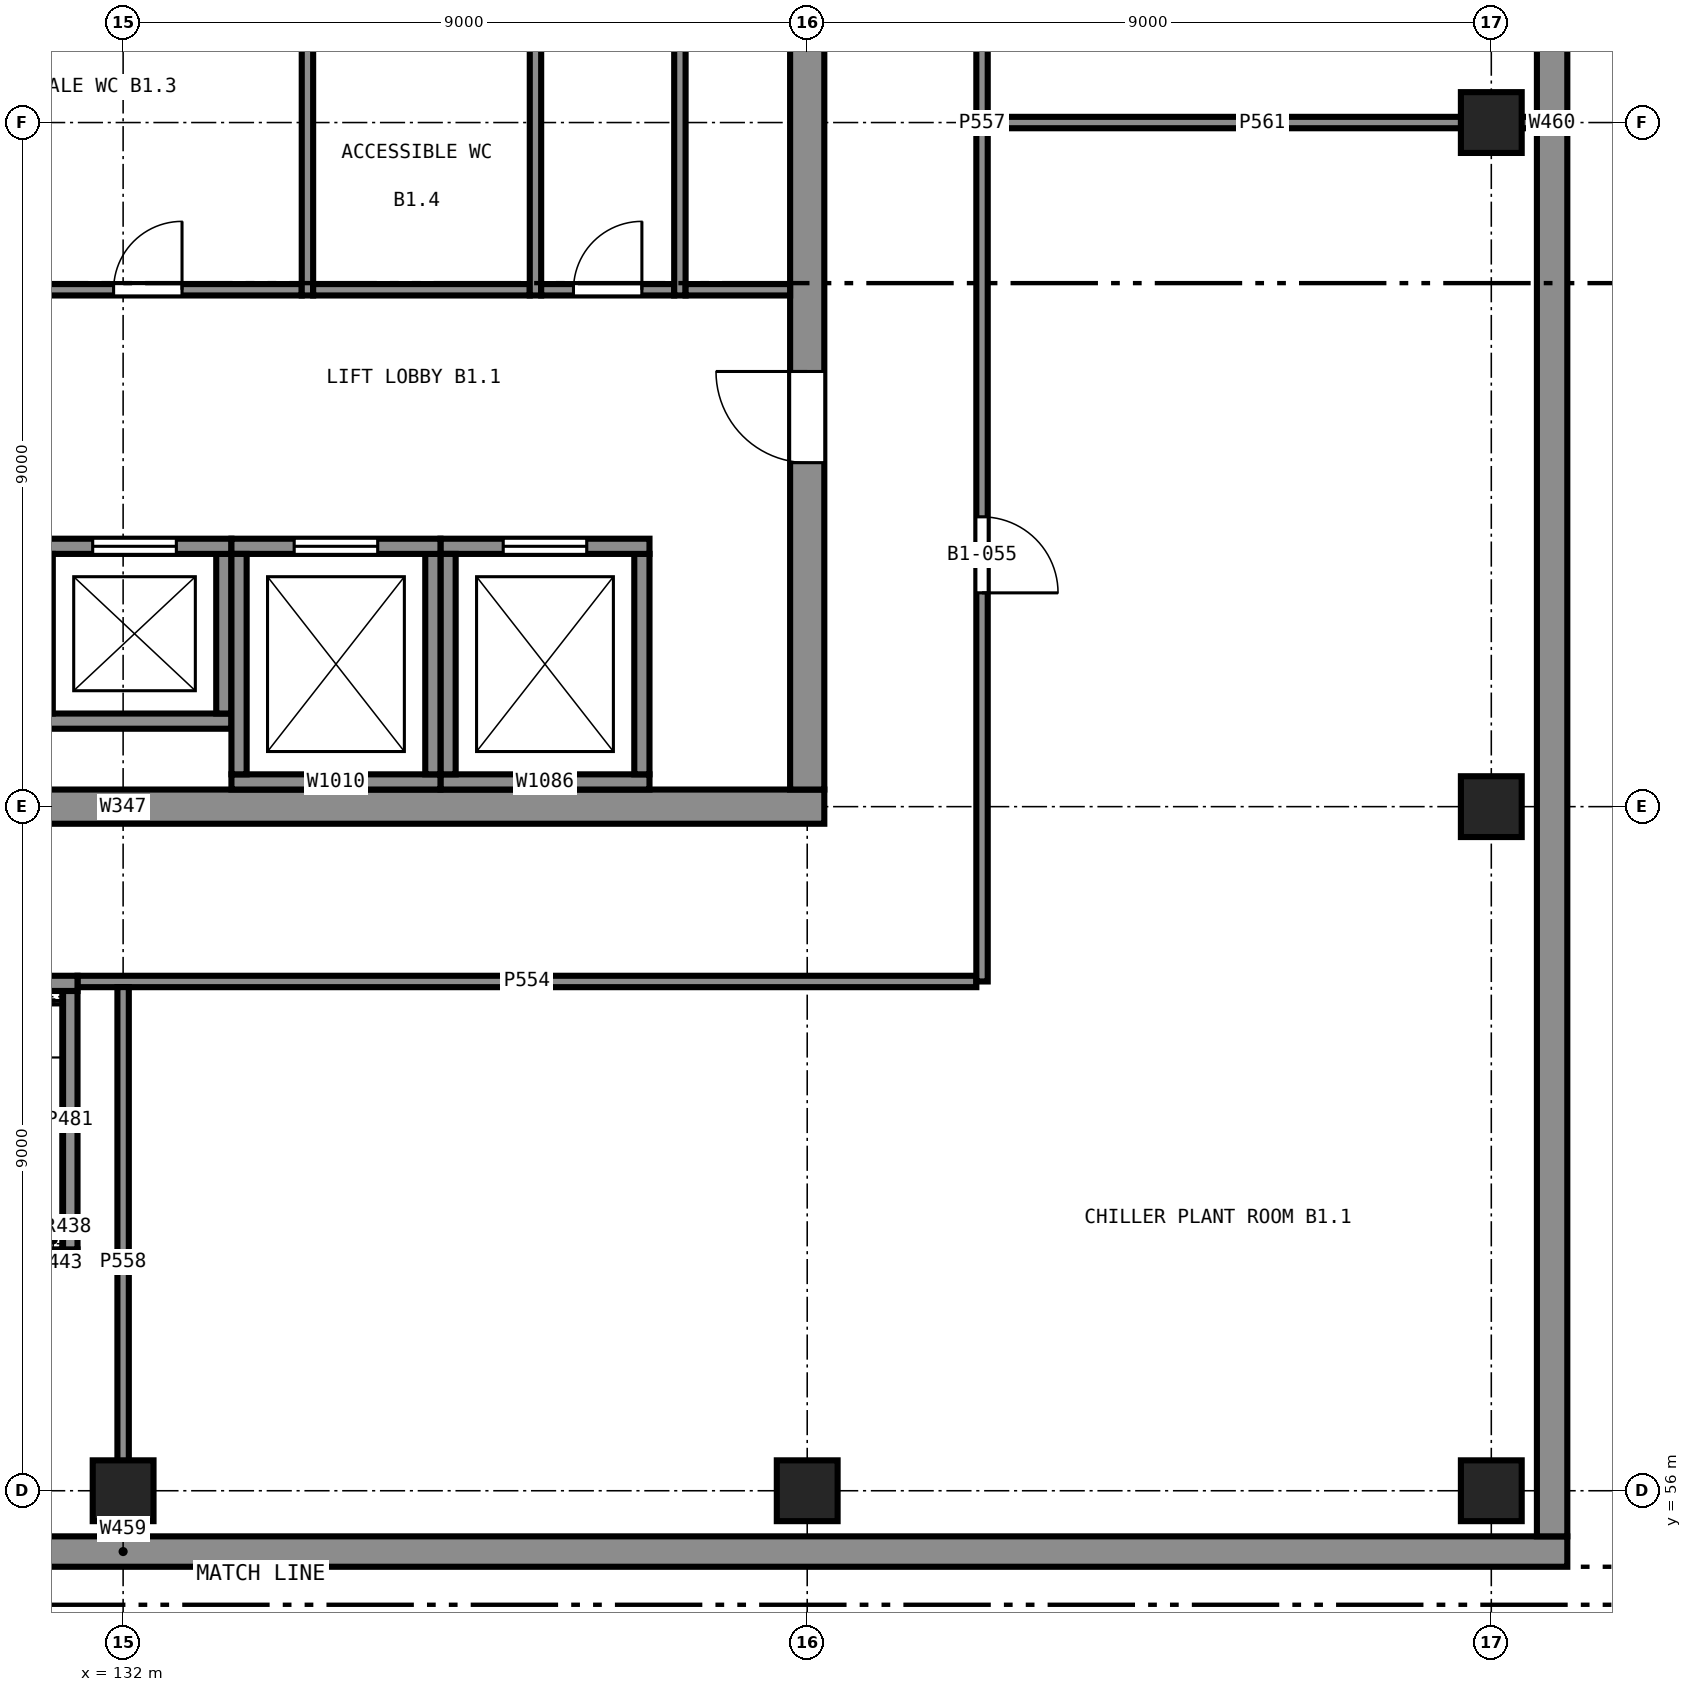
"""IFC4 building model, lengths in metres.
Left out: names, types, materials, properties, quantities, classifications, styles, units other than length and angle.
Written with IfcOpenShell. Run it as: python <this file> out.ifc"""

import sys

from ifc_helpers import new_model, si_unit, direction, frame, frame_2d, origin, origin_2d, place, context, subcontext, project, spatial, rectangle, extrude, element, fill, save


model = new_model("IFC4")
c1 = context("Model", 3, precision=1e-05, world=origin(), true_north=direction((0.0, 1.0)))
c2 = subcontext(c1, "Body", "Model", "MODEL_VIEW")
j1 = project(units=[si_unit("LENGTHUNIT", "METRE"), si_unit("PLANEANGLEUNIT", "RADIAN")], contexts=[c1])
p1 = place(None, origin())
s1 = spatial("IfcSite", under=j1, at=p1, CompositionType="ELEMENT")
p2 = place(p1, origin())
s2 = spatial("IfcBuilding", under=s1, at=p2, CompositionType="ELEMENT")
p3 = place(p2, frame((0.0, 0.0, -5.0)))
s3 = spatial("IfcBuildingStorey", under=s2, at=p3, CompositionType="ELEMENT", Elevation=-5.0)
for number, where, z_axis, x_axis in (
    (1, (132.0, 56.0, 0.0), (0.0, 0.0, 1.0), (1.0, 0.0, 0.0)),
    (2, (141.0, 56.0, 0.0), (0.0, 0.0, 1.0), (1.0, 0.0, 0.0)),
    (3, (150.0, 56.0, 0.0), (0.0, 0.0, 1.0), (1.0, 0.0, 0.0)),
    (4, (150.0, 65.0, 0.0), (0.0, 0.0, 1.0), (1.0, 0.0, 0.0)),
    (5, (150.0, 74.0, 0.0), (0.0, 0.0, 1.0), (1.0, 0.0, 0.0)),
):
    element("IfcColumn", number, at=place(p3, frame(where, z_axis=z_axis, x_axis=x_axis)), inside=s3, PredefinedType="COLUMN", context=c2, shape_type="SweptSolid", body=[
        extrude(rectangle(XDim=0.8, YDim=0.8, at=origin_2d()), origin(), (0.0, 0.0, 1.0), 5.0),
    ])
p4 = place(p3, frame((122.775, 65.0, 0.0), z_axis=(0.0, 0.0, 1.0), x_axis=(1.0, 0.0, 0.0)))
e6 = element("IfcWall", 6, at=p4, inside=s3, PredefinedType="SHEAR", context=c2, shape_type="SweptSolid", body=[
    extrude(rectangle(XDim=18.45, YDim=0.45, at=frame_2d((9.225, 0.0))), origin(), (0.0, 0.0, 1.0), 5.0),
])
p5 = place(p3, frame((141.0, 65.225, 0.0), z_axis=(0.0, 0.0, 1.0), x_axis=(0.0, 1.0, 0.0)))
e7 = element("IfcWall", 7, at=p5, inside=s3, PredefinedType="SHEAR", context=c2, shape_type="SweptSolid", body=[
    extrude(rectangle(XDim=17.55, YDim=0.45, at=frame_2d((8.775, 0.0))), origin(), (0.0, 0.0, 1.0), 5.0),
])
p6 = place(p5, frame((4.3, 0.0, 0.0)))
e8 = element("IfcOpeningElement", 8, at=p6, cuts=e7, PredefinedType="OPENING", context=c2, shape_type="SweptSolid", body=[
    extrude(rectangle(XDim=1.2, YDim=2.1, at=frame_2d((0.6, 1.05))), frame((0.0, 0.235, 0.0), z_axis=(0.0, -1.0, 0.0), x_axis=(1.0, 0.0, 0.0)), (0.0, 0.0, 1.0), 0.47),
])
p7 = place(p5, frame((12.05, 0.0, 0.0)))
e9 = element("IfcOpeningElement", 9, at=p7, cuts=e7, PredefinedType="OPENING", context=c2, shape_type="SweptSolid", body=[
    extrude(rectangle(XDim=1.2, YDim=2.1, at=frame_2d((0.6, 1.05))), frame((0.0, 0.235, 0.0), z_axis=(0.0, -1.0, 0.0), x_axis=(1.0, 0.0, 0.0)), (0.0, 0.0, 1.0), 0.47),
])
p8 = place(p3, frame((113.0, 55.2, 0.0), z_axis=(0.0, 0.0, 1.0), x_axis=(1.0, 0.0, 0.0)))
e10 = element("IfcWall", 10, at=p8, inside=s3, PredefinedType="SOLIDWALL", context=c2, shape_type="SweptSolid", body=[
    extrude(rectangle(XDim=38.0, YDim=0.4, at=frame_2d((19.0, 0.0))), origin(), (0.0, 0.0, 1.0), 4.58),
])
p9 = place(p3, frame((150.8, 55.4, 0.0), z_axis=(0.0, 0.0, 1.0), x_axis=(0.0, 1.0, 0.0)))
e11 = element("IfcWall", 11, at=p9, inside=s3, PredefinedType="SOLIDWALL", context=c2, shape_type="SweptSolid", body=[
    extrude(rectangle(XDim=37.2, YDim=0.4, at=frame_2d((18.6, 0.0))), origin(), (0.0, 0.0, 1.0), 4.58),
])
p10 = place(p3, frame((130.875, 66.125, 0.0), z_axis=(0.0, 0.0, 1.0), x_axis=(1.0, 0.0, 0.0)))
e12 = element("IfcWall", 12, at=p10, inside=s3, PredefinedType="SHEAR", context=c2, shape_type="SweptSolid", body=[
    extrude(rectangle(XDim=2.55, YDim=0.2, at=frame_2d((1.275, 0.0))), origin(), (0.0, 0.0, 1.0), 5.0),
])
p11 = place(p3, frame((133.325, 66.225, 0.0), z_axis=(0.0, 0.0, 1.0), x_axis=(0.0, 1.0, 0.0)))
e13 = element("IfcWall", 13, at=p11, inside=s3, PredefinedType="SHEAR", context=c2, shape_type="SweptSolid", body=[
    extrude(rectangle(XDim=2.1, YDim=0.2, at=frame_2d((1.05, 0.0))), origin(), (0.0, 0.0, 1.0), 5.0),
])
p12 = place(p3, frame((133.425, 68.425, 0.0), z_axis=(0.0, 0.0, 1.0), x_axis=(-1.0, 0.0, 0.0)))
e14 = element("IfcWall", 14, at=p12, inside=s3, PredefinedType="SHEAR", context=c2, shape_type="SweptSolid", body=[
    extrude(rectangle(XDim=2.55, YDim=0.2, at=frame_2d((1.275, 0.0))), origin(), (0.0, 0.0, 1.0), 5.0),
])
p13 = place(p12, frame((0.725, 0.0, 0.0)))
e15 = element("IfcOpeningElement", 15, at=p13, cuts=e14, PredefinedType="OPENING", context=c2, shape_type="SweptSolid", body=[
    extrude(rectangle(XDim=1.1, YDim=2.1, at=frame_2d((0.55, 1.05))), frame((0.0, 0.11, 0.0), z_axis=(0.0, -1.0, 0.0), x_axis=(1.0, 0.0, 0.0)), (0.0, 0.0, 1.0), 0.22),
])
p14 = place(p3, frame((130.975, 68.325, 0.0), z_axis=(0.0, 0.0, 1.0), x_axis=(0.0, -1.0, 0.0)))
e16 = element("IfcWall", 16, at=p14, inside=s3, PredefinedType="SHEAR", context=c2, shape_type="SweptSolid", body=[
    extrude(rectangle(XDim=2.1, YDim=0.2, at=frame_2d((1.05, 0.0))), origin(), (0.0, 0.0, 1.0), 5.0),
])
p15 = place(p3, frame((133.425, 65.325, 0.0), z_axis=(0.0, 0.0, 1.0), x_axis=(1.0, 0.0, 0.0)))
e17 = element("IfcWall", 17, at=p15, inside=s3, PredefinedType="SHEAR", context=c2, shape_type="SweptSolid", body=[
    extrude(rectangle(XDim=2.75, YDim=0.2, at=frame_2d((1.375, 0.0))), origin(), (0.0, 0.0, 1.0), 5.0),
])
p16 = place(p3, frame((136.075, 65.425, 0.0), z_axis=(0.0, 0.0, 1.0), x_axis=(0.0, 1.0, 0.0)))
e18 = element("IfcWall", 18, at=p16, inside=s3, PredefinedType="SHEAR", context=c2, shape_type="SweptSolid", body=[
    extrude(rectangle(XDim=2.9, YDim=0.2, at=frame_2d((1.45, 0.0))), origin(), (0.0, 0.0, 1.0), 5.0),
])
p17 = place(p3, frame((136.175, 68.425, 0.0), z_axis=(0.0, 0.0, 1.0), x_axis=(-1.0, 0.0, 0.0)))
e19 = element("IfcWall", 19, at=p17, inside=s3, PredefinedType="SHEAR", context=c2, shape_type="SweptSolid", body=[
    extrude(rectangle(XDim=2.75, YDim=0.2, at=frame_2d((1.375, 0.0))), origin(), (0.0, 0.0, 1.0), 5.0),
])
p18 = place(p17, frame((0.825, 0.0, 0.0)))
e20 = element("IfcOpeningElement", 20, at=p18, cuts=e19, PredefinedType="OPENING", context=c2, shape_type="SweptSolid", body=[
    extrude(rectangle(XDim=1.1, YDim=2.1, at=frame_2d((0.55, 1.05))), frame((0.0, 0.11, 0.0), z_axis=(0.0, -1.0, 0.0), x_axis=(1.0, 0.0, 0.0)), (0.0, 0.0, 1.0), 0.22),
])
p19 = place(p3, frame((133.525, 68.325, 0.0), z_axis=(0.0, 0.0, 1.0), x_axis=(0.0, -1.0, 0.0)))
e21 = element("IfcWall", 21, at=p19, inside=s3, PredefinedType="SHEAR", context=c2, shape_type="SweptSolid", body=[
    extrude(rectangle(XDim=2.9, YDim=0.2, at=frame_2d((1.45, 0.0))), origin(), (0.0, 0.0, 1.0), 5.0),
])
p20 = place(p3, frame((136.175, 65.325, 0.0), z_axis=(0.0, 0.0, 1.0), x_axis=(1.0, 0.0, 0.0)))
e22 = element("IfcWall", 22, at=p20, inside=s3, PredefinedType="SHEAR", context=c2, shape_type="SweptSolid", body=[
    extrude(rectangle(XDim=2.75, YDim=0.2, at=frame_2d((1.375, 0.0))), origin(), (0.0, 0.0, 1.0), 5.0),
])
p21 = place(p3, frame((138.825, 65.425, 0.0), z_axis=(0.0, 0.0, 1.0), x_axis=(0.0, 1.0, 0.0)))
e23 = element("IfcWall", 23, at=p21, inside=s3, PredefinedType="SHEAR", context=c2, shape_type="SweptSolid", body=[
    extrude(rectangle(XDim=2.9, YDim=0.2, at=frame_2d((1.45, 0.0))), origin(), (0.0, 0.0, 1.0), 5.0),
])
p22 = place(p3, frame((138.925, 68.425, 0.0), z_axis=(0.0, 0.0, 1.0), x_axis=(-1.0, 0.0, 0.0)))
e24 = element("IfcWall", 24, at=p22, inside=s3, PredefinedType="SHEAR", context=c2, shape_type="SweptSolid", body=[
    extrude(rectangle(XDim=2.75, YDim=0.2, at=frame_2d((1.375, 0.0))), origin(), (0.0, 0.0, 1.0), 5.0),
])
p23 = place(p22, frame((0.825, 0.0, 0.0)))
e25 = element("IfcOpeningElement", 25, at=p23, cuts=e24, PredefinedType="OPENING", context=c2, shape_type="SweptSolid", body=[
    extrude(rectangle(XDim=1.1, YDim=2.1, at=frame_2d((0.55, 1.05))), frame((0.0, 0.11, 0.0), z_axis=(0.0, -1.0, 0.0), x_axis=(1.0, 0.0, 0.0)), (0.0, 0.0, 1.0), 0.22),
])
p24 = place(p3, frame((136.275, 68.325, 0.0), z_axis=(0.0, 0.0, 1.0), x_axis=(0.0, -1.0, 0.0)))
e26 = element("IfcWall", 26, at=p24, inside=s3, PredefinedType="SHEAR", context=c2, shape_type="SweptSolid", body=[
    extrude(rectangle(XDim=2.9, YDim=0.2, at=frame_2d((1.45, 0.0))), origin(), (0.0, 0.0, 1.0), 5.0),
])
p25 = place(p3, frame((123.6, 59.075, 0.0), z_axis=(0.0, 0.0, 1.0), x_axis=(1.0, 0.0, 0.0)))
e27 = element("IfcWall", 27, at=p25, inside=s3, PredefinedType="SHEAR", context=c2, shape_type="SweptSolid", body=[
    extrude(rectangle(XDim=7.8, YDim=0.2, at=frame_2d((3.9, 0.0))), origin(), (0.0, 0.0, 1.0), 4.58),
])
p26 = place(p3, frame((131.3, 59.175, 0.0), z_axis=(0.0, 0.0, 1.0), x_axis=(0.0, 1.0, 0.0)))
e28 = element("IfcWall", 28, at=p26, inside=s3, PredefinedType="SHEAR", context=c2, shape_type="SweptSolid", body=[
    extrude(rectangle(XDim=3.4, YDim=0.2, at=frame_2d((1.7, 0.0))), origin(), (0.0, 0.0, 1.0), 4.58),
])
p27 = place(p3, frame((131.4, 62.675, 0.0), z_axis=(0.0, 0.0, 1.0), x_axis=(-1.0, 0.0, 0.0)))
e29 = element("IfcWall", 29, at=p27, inside=s3, PredefinedType="SHEAR", context=c2, shape_type="SweptSolid", body=[
    extrude(rectangle(XDim=7.8, YDim=0.2, at=frame_2d((3.9, 0.0))), origin(), (0.0, 0.0, 1.0), 4.58),
])
p28 = place(p27, frame((6.2, 0.0, 0.0)))
e30 = element("IfcOpeningElement", 30, at=p28, cuts=e29, PredefinedType="OPENING", context=c2, shape_type="SweptSolid", body=[
    extrude(rectangle(XDim=1.0, YDim=2.1, at=frame_2d((0.5, 1.05))), frame((0.0, 0.11, 0.0), z_axis=(0.0, -1.0, 0.0), x_axis=(1.0, 0.0, 0.0)), (0.0, 0.0, 1.0), 0.22),
])
p29 = place(p3, frame((134.425, 71.725, 0.0), z_axis=(0.0, 0.0, 1.0), x_axis=(0.0, 1.0, 0.0)))
e31 = element("IfcWall", 31, at=p29, inside=s3, PredefinedType="PARTITIONING", context=c2, shape_type="SweptSolid", body=[
    extrude(rectangle(XDim=4.55, YDim=0.15, at=frame_2d((2.275, 0.0))), origin(), (0.0, 0.0, 1.0), 4.58),
])
p30 = place(p3, frame((130.3, 71.8, 0.0), z_axis=(0.0, 0.0, 1.0), x_axis=(1.0, 0.0, 0.0)))
e32 = element("IfcWall", 32, at=p30, inside=s3, PredefinedType="PARTITIONING", context=c2, shape_type="SweptSolid", body=[
    extrude(rectangle(XDim=4.05, YDim=0.15, at=frame_2d((2.025, 0.0))), origin(), (0.0, 0.0, 1.0), 4.58),
])
p31 = place(p30, frame((1.575, 0.0, 0.0)))
e33 = element("IfcOpeningElement", 33, at=p31, cuts=e32, PredefinedType="OPENING", context=c2, shape_type="SweptSolid", body=[
    extrude(rectangle(XDim=0.9, YDim=2.1, at=frame_2d((0.45, 1.05))), frame((0.0, 0.085, 0.0), z_axis=(0.0, -1.0, 0.0), x_axis=(1.0, 0.0, 0.0)), (0.0, 0.0, 1.0), 0.17),
])
p32 = place(p3, frame((137.425, 71.725, 0.0), z_axis=(0.0, 0.0, 1.0), x_axis=(0.0, 1.0, 0.0)))
e34 = element("IfcWall", 34, at=p32, inside=s3, PredefinedType="PARTITIONING", context=c2, shape_type="SweptSolid", body=[
    extrude(rectangle(XDim=4.55, YDim=0.15, at=frame_2d((2.275, 0.0))), origin(), (0.0, 0.0, 1.0), 4.58),
])
p33 = place(p3, frame((134.5, 71.8, 0.0), z_axis=(0.0, 0.0, 1.0), x_axis=(1.0, 0.0, 0.0)))
e35 = element("IfcWall", 35, at=p33, inside=s3, PredefinedType="PARTITIONING", context=c2, shape_type="SweptSolid", body=[
    extrude(rectangle(XDim=2.85, YDim=0.15, at=frame_2d((1.425, 0.0))), origin(), (0.0, 0.0, 1.0), 4.58),
])
p34 = place(p3, frame((139.325, 71.725, 0.0), z_axis=(0.0, 0.0, 1.0), x_axis=(0.0, 1.0, 0.0)))
e36 = element("IfcWall", 36, at=p34, inside=s3, PredefinedType="PARTITIONING", context=c2, shape_type="SweptSolid", body=[
    extrude(rectangle(XDim=4.55, YDim=0.15, at=frame_2d((2.275, 0.0))), origin(), (0.0, 0.0, 1.0), 4.58),
])
p35 = place(p3, frame((137.5, 71.8, 0.0), z_axis=(0.0, 0.0, 1.0), x_axis=(1.0, 0.0, 0.0)))
e37 = element("IfcWall", 37, at=p35, inside=s3, PredefinedType="PARTITIONING", context=c2, shape_type="SweptSolid", body=[
    extrude(rectangle(XDim=1.75, YDim=0.15, at=frame_2d((0.875, 0.0))), origin(), (0.0, 0.0, 1.0), 4.58),
])
p36 = place(p35, frame((0.425, 0.0, 0.0)))
e38 = element("IfcOpeningElement", 38, at=p36, cuts=e37, PredefinedType="OPENING", context=c2, shape_type="SweptSolid", body=[
    extrude(rectangle(XDim=0.9, YDim=2.1, at=frame_2d((0.45, 1.05))), frame((0.0, 0.085, 0.0), z_axis=(0.0, -1.0, 0.0), x_axis=(1.0, 0.0, 0.0)), (0.0, 0.0, 1.0), 0.17),
])
p37 = place(p3, frame((139.4, 71.8, 0.0), z_axis=(0.0, 0.0, 1.0), x_axis=(1.0, 0.0, 0.0)))
e39 = element("IfcWall", 39, at=p37, inside=s3, PredefinedType="PARTITIONING", context=c2, shape_type="SweptSolid", body=[
    extrude(rectangle(XDim=1.375, YDim=0.15, at=frame_2d((0.688, 0.0))), origin(), (0.0, 0.0, 1.0), 4.58),
])
p38 = place(p3, frame((143.225, 62.7, 0.0), z_axis=(0.0, 0.0, 1.0), x_axis=(-1.0, 0.0, 0.0)))
e40 = element("IfcWall", 40, at=p38, inside=s3, PredefinedType="PARTITIONING", context=c2, shape_type="SweptSolid", body=[
    extrude(rectangle(XDim=11.825, YDim=0.15, at=frame_2d((5.913, 0.0))), origin(), (0.0, 0.0, 1.0), 4.58),
])
p39 = place(p3, frame((143.3, 85.3, 0.0), z_axis=(0.0, 0.0, 1.0), x_axis=(0.0, -1.0, 0.0)))
e41 = element("IfcWall", 41, at=p39, inside=s3, PredefinedType="PARTITIONING", context=c2, shape_type="SweptSolid", body=[
    extrude(rectangle(XDim=22.6, YDim=0.15, at=frame_2d((11.3, 0.0))), origin(), (0.0, 0.0, 1.0), 4.58),
])
p40 = place(p39, frame((16.488, 0.0, 0.0)))
e42 = element("IfcOpeningElement", 42, at=p40, cuts=e41, PredefinedType="OPENING", context=c2, shape_type="SweptSolid", body=[
    extrude(rectangle(XDim=1.0, YDim=2.1, at=frame_2d((0.5, 1.05))), frame((0.0, 0.085, 0.0), z_axis=(0.0, -1.0, 0.0), x_axis=(1.0, 0.0, 0.0)), (0.0, 0.0, 1.0), 0.17),
])
p41 = place(p39, frame((5.113, 0.0, 0.0)))
e43 = element("IfcOpeningElement", 43, at=p41, cuts=e41, PredefinedType="OPENING", context=c2, shape_type="SweptSolid", body=[
    extrude(rectangle(XDim=1.0, YDim=2.1, at=frame_2d((0.5, 1.05))), frame((0.0, 0.085, 0.0), z_axis=(0.0, -1.0, 0.0), x_axis=(1.0, 0.0, 0.0)), (0.0, 0.0, 1.0), 0.17),
])
for number, where, z_axis, x_axis in (
    (44, (132.0, 55.399, 0.0), (0.0, 0.0, 1.0), (0.0, 1.0, 0.0)),
    (45, (143.374, 74.0, 0.0), (0.0, 0.0, 1.0), (1.0, 0.0, 0.0)),
):
    element("IfcWall", number, at=place(p3, frame(where, z_axis=z_axis, x_axis=x_axis)), inside=s3, PredefinedType="PARTITIONING", context=c2, shape_type="SweptSolid", body=[
        extrude(rectangle(XDim=7.227, YDim=0.15, at=frame_2d((3.614, 0.0))), origin(), (0.0, 0.0, 1.0), 3.68),
    ])
p42 = place(p13, origin())
e46 = element("IfcDoor", 46, at=p42, inside=s3, OperationType="SLIDING_TO_LEFT", PredefinedType="DOOR", context=c2, shape_type="SweptSolid", body=[
    extrude(rectangle(XDim=1.1, YDim=2.1, at=frame_2d((0.55, 1.05))), frame((0.0, 0.025, 0.0), z_axis=(0.0, -1.0, 0.0), x_axis=(1.0, 0.0, 0.0)), (0.0, 0.0, 1.0), 0.05),
])
fill(e15, e46)
p43 = place(p18, origin())
e47 = element("IfcDoor", 47, at=p43, inside=s3, OperationType="SLIDING_TO_LEFT", PredefinedType="DOOR", context=c2, shape_type="SweptSolid", body=[
    extrude(rectangle(XDim=1.1, YDim=2.1, at=frame_2d((0.55, 1.05))), frame((0.0, 0.025, 0.0), z_axis=(0.0, -1.0, 0.0), x_axis=(1.0, 0.0, 0.0)), (0.0, 0.0, 1.0), 0.05),
])
fill(e20, e47)
p44 = place(p23, origin())
e48 = element("IfcDoor", 48, at=p44, inside=s3, OperationType="SLIDING_TO_LEFT", PredefinedType="DOOR", context=c2, shape_type="SweptSolid", body=[
    extrude(rectangle(XDim=1.1, YDim=2.1, at=frame_2d((0.55, 1.05))), frame((0.0, 0.025, 0.0), z_axis=(0.0, -1.0, 0.0), x_axis=(1.0, 0.0, 0.0)), (0.0, 0.0, 1.0), 0.05),
])
fill(e25, e48)
p45 = place(p6, origin())
e49 = element("IfcDoor", 49, at=p45, inside=s3, OperationType="SINGLE_SWING_LEFT", PredefinedType="DOOR", context=c2, shape_type="SweptSolid", body=[
    extrude(rectangle(XDim=1.2, YDim=2.1, at=frame_2d((0.6, 1.05))), frame((0.0, 0.025, 0.0), z_axis=(0.0, -1.0, 0.0), x_axis=(1.0, 0.0, 0.0)), (0.0, 0.0, 1.0), 0.05),
])
fill(e8, e49)
p46 = place(p31, origin())
e50 = element("IfcDoor", 50, at=p46, inside=s3, OperationType="SINGLE_SWING_LEFT", PredefinedType="DOOR", context=c2, shape_type="SweptSolid", body=[
    extrude(rectangle(XDim=0.9, YDim=2.1, at=frame_2d((0.45, 1.05))), frame((0.0, 0.025, 0.0), z_axis=(0.0, -1.0, 0.0), x_axis=(1.0, 0.0, 0.0)), (0.0, 0.0, 1.0), 0.05),
])
fill(e33, e50)
p47 = place(p36, origin())
e51 = element("IfcDoor", 51, at=p47, inside=s3, OperationType="SINGLE_SWING_LEFT", PredefinedType="DOOR", context=c2, shape_type="SweptSolid", body=[
    extrude(rectangle(XDim=0.9, YDim=2.1, at=frame_2d((0.45, 1.05))), frame((0.0, 0.025, 0.0), z_axis=(0.0, -1.0, 0.0), x_axis=(1.0, 0.0, 0.0)), (0.0, 0.0, 1.0), 0.05),
])
fill(e38, e51)
p48 = place(p40, origin())
e52 = element("IfcDoor", 52, at=p48, inside=s3, OperationType="SINGLE_SWING_LEFT", PredefinedType="DOOR", context=c2, shape_type="SweptSolid", body=[
    extrude(rectangle(XDim=1.0, YDim=2.1, at=frame_2d((0.5, 1.05))), frame((0.0, 0.025, 0.0), z_axis=(0.0, -1.0, 0.0), x_axis=(1.0, 0.0, 0.0)), (0.0, 0.0, 1.0), 0.05),
])
fill(e42, e52)
save(model, sys.argv[1])
